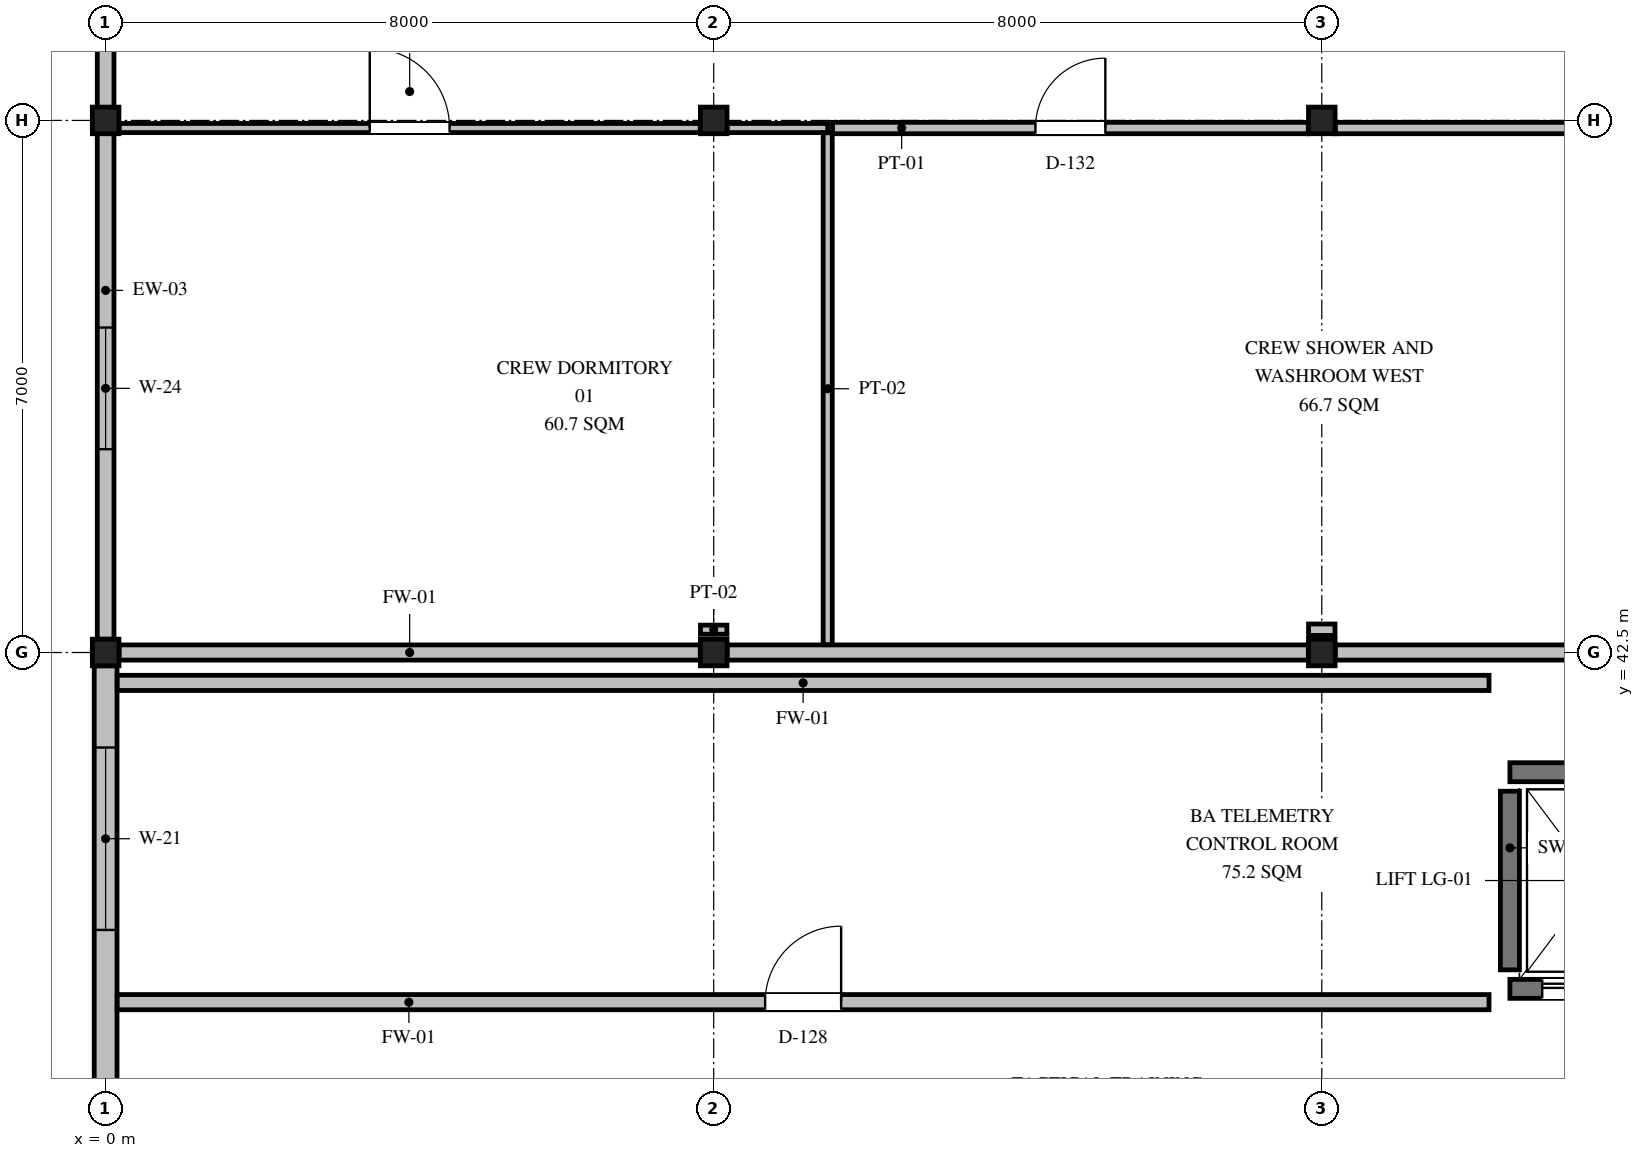
"""IFC4 building model, lengths in metres.
Left out: names, types, materials, properties, quantities, classifications, styles, units other than length and angle.
Written with IfcOpenShell. Run it as: python <this file> out.ifc"""

import sys

from ifc_helpers import new_model, si_unit, direction, frame, frame_2d, origin, origin_2d, place, context, subcontext, project, spatial, rectangle, i_section, extrude, element, fill, save


model = new_model("IFC4")
c1 = context("Model", 3, precision=1e-05, world=origin(), true_north=direction((0.0, 1.0)))
c2 = subcontext(c1, "Body", "Model", "MODEL_VIEW")
j1 = project(units=[si_unit("LENGTHUNIT", "METRE"), si_unit("PLANEANGLEUNIT", "RADIAN")], contexts=[c1])
p1 = place(None, origin())
s1 = spatial("IfcSite", under=j1, at=p1, CompositionType="ELEMENT")
p2 = place(p1, origin())
s2 = spatial("IfcBuilding", under=s1, at=p2, CompositionType="ELEMENT")
p3 = place(p2, frame((0.0, 0.0, 5.85)))
s3 = spatial("IfcBuildingStorey", under=s2, at=p3, CompositionType="ELEMENT", Elevation=5.85)
for number, where, z_axis, x_axis in (
    (1, (0.0, 42.5, 0.0), (0.0, 0.0, 1.0), (1.0, 0.0, 0.0)),
    (2, (0.0, 49.5, 0.0), (0.0, 0.0, 1.0), (1.0, 0.0, 0.0)),
    (3, (8.0, 42.5, 0.0), (0.0, 0.0, 1.0), (1.0, 0.0, 0.0)),
    (4, (8.0, 49.5, 0.0), (0.0, 0.0, 1.0), (1.0, 0.0, 0.0)),
    (5, (16.0, 42.5, 0.0), (0.0, 0.0, 1.0), (1.0, 0.0, 0.0)),
    (6, (16.0, 49.5, 0.0), (0.0, 0.0, 1.0), (1.0, 0.0, 0.0)),
):
    element("IfcColumn", number, at=place(p3, frame(where, z_axis=z_axis, x_axis=x_axis)), inside=s3, PredefinedType="COLUMN", context=c2, shape_type="SweptSolid", body=[
        extrude(i_section(OverallWidth=0.35, OverallDepth=0.35, WebThickness=0.012, FlangeThickness=0.019, FilletRadius=0.02, at=origin_2d()), origin(), (0.0, 0.0, 1.0), 4.2),
    ])
p4 = place(p3, frame((0.0, 22.65, 0.0), z_axis=(0.0, 0.0, 1.0), x_axis=(0.0, 1.0, 0.0)))
e7 = element("IfcWall", 7, at=p4, inside=s3, PredefinedType="SOLIDWALL", context=c2, shape_type="SweptSolid", body=[
    extrude(rectangle(XDim=19.675, YDim=0.3, at=frame_2d((9.837, 0.0))), origin(), (0.0, 0.0, 1.0), 3.444),
])
p5 = place(p4, frame((8.5, 0.0, 1.1)))
e8 = element("IfcOpeningElement", 8, at=p5, cuts=e7, PredefinedType="OPENING", context=c2, shape_type="SweptSolid", body=[
    extrude(rectangle(XDim=2.2, YDim=1.5, at=frame_2d((1.1, 0.75))), frame((0.0, 0.16, 0.0), z_axis=(0.0, -1.0, 0.0), x_axis=(1.0, 0.0, 0.0)), (0.0, 0.0, 1.0), 0.32),
])
p6 = place(p4, frame((16.2, 0.0, 1.1)))
e9 = element("IfcOpeningElement", 9, at=p6, cuts=e7, PredefinedType="OPENING", context=c2, shape_type="SweptSolid", body=[
    extrude(rectangle(XDim=2.4, YDim=1.5, at=frame_2d((1.2, 0.75))), frame((0.0, 0.16, 0.0), z_axis=(0.0, -1.0, 0.0), x_axis=(1.0, 0.0, 0.0)), (0.0, 0.0, 1.0), 0.32),
])
p7 = place(p3, frame((0.0, 42.675, 0.0), z_axis=(0.0, 0.0, 1.0), x_axis=(0.0, 1.0, 0.0)))
e10 = element("IfcWall", 10, at=p7, inside=s3, PredefinedType="SOLIDWALL", context=c2, shape_type="SweptSolid", body=[
    extrude(rectangle(XDim=13.65, YDim=0.22, at=frame_2d((6.825, 0.0))), origin(), (0.0, 0.0, 1.0), 3.494),
])
p8 = place(p7, frame((2.5, 0.0, 1.0)))
e11 = element("IfcOpeningElement", 11, at=p8, cuts=e10, PredefinedType="OPENING", context=c2, shape_type="SweptSolid", body=[
    extrude(rectangle(XDim=1.6, YDim=1.8, at=frame_2d((0.8, 0.9))), frame((0.0, 0.12, 0.0), z_axis=(0.0, -1.0, 0.0), x_axis=(1.0, 0.0, 0.0)), (0.0, 0.0, 1.0), 0.24),
])
p9 = place(p3, frame((18.475, 38.075, 0.0), z_axis=(0.0, 0.0, 1.0), x_axis=(1.0, 0.0, 0.0)))
e12 = element("IfcWall", 12, at=p9, inside=s3, PredefinedType="SHEAR", context=c2, shape_type="SweptSolid", body=[
    extrude(rectangle(XDim=2.25, YDim=0.25, at=frame_2d((1.125, 0.0))), origin(), (0.0, 0.0, 1.0), 4.0),
])
p10 = place(p9, frame((0.425, 0.0, 0.0)))
e13 = element("IfcOpeningElement", 13, at=p10, cuts=e12, PredefinedType="OPENING", context=c2, shape_type="SweptSolid", body=[
    extrude(rectangle(XDim=1.4, YDim=2.2, at=frame_2d((0.7, 1.1))), frame((0.0, 0.135, 0.0), z_axis=(0.0, -1.0, 0.0), x_axis=(1.0, 0.0, 0.0)), (0.0, 0.0, 1.0), 0.27),
])
p11 = place(p3, frame((18.475, 40.925, 0.0), z_axis=(0.0, 0.0, 1.0), x_axis=(1.0, 0.0, 0.0)))
e14 = element("IfcWall", 14, at=p11, inside=s3, PredefinedType="SHEAR", context=c2, shape_type="SweptSolid", body=[
    extrude(rectangle(XDim=2.25, YDim=0.25, at=frame_2d((1.125, 0.0))), origin(), (0.0, 0.0, 1.0), 4.0),
])
p12 = place(p3, frame((18.475, 38.325, 0.0), z_axis=(0.0, 0.0, 1.0), x_axis=(0.0, 1.0, 0.0)))
e15 = element("IfcWall", 15, at=p12, inside=s3, PredefinedType="SHEAR", context=c2, shape_type="SweptSolid", body=[
    extrude(rectangle(XDim=2.35, YDim=0.25, at=frame_2d((1.175, 0.0))), origin(), (0.0, 0.0, 1.0), 4.0),
])
p13 = place(p3, frame((0.177, 42.5, 0.0), z_axis=(0.0, 0.0, 1.0), x_axis=(1.0, 0.0, 0.0)))
e16 = element("IfcWall", 16, at=p13, inside=s3, PredefinedType="PARTITIONING", context=c2, shape_type="SweptSolid", body=[
    extrude(rectangle(XDim=7.646, YDim=0.2, at=frame_2d((3.823, 0.0))), origin(), (0.0, 0.0, 1.0), 3.494),
])
p14 = place(p3, frame((8.177, 42.5, 0.0), z_axis=(0.0, 0.0, 1.0), x_axis=(1.0, 0.0, 0.0)))
e17 = element("IfcWall", 17, at=p14, inside=s3, PredefinedType="PARTITIONING", context=c2, shape_type="SweptSolid", body=[
    extrude(rectangle(XDim=7.646, YDim=0.2, at=frame_2d((3.823, 0.0))), origin(), (0.0, 0.0, 1.0), 3.544),
])
p15 = place(p3, frame((16.177, 42.5, 0.0), z_axis=(0.0, 0.0, 1.0), x_axis=(1.0, 0.0, 0.0)))
e18 = element("IfcWall", 18, at=p15, inside=s3, PredefinedType="PARTITIONING", context=c2, shape_type="SweptSolid", body=[
    extrude(rectangle(XDim=7.646, YDim=0.2, at=frame_2d((3.823, 0.0))), origin(), (0.0, 0.0, 1.0), 3.494),
])
p16 = place(p3, frame((0.153, 37.9, 0.0), z_axis=(0.0, 0.0, 1.0), x_axis=(1.0, 0.0, 0.0)))
e19 = element("IfcWall", 19, at=p16, inside=s3, PredefinedType="PARTITIONING", context=c2, shape_type="SweptSolid", body=[
    extrude(rectangle(XDim=18.047, YDim=0.2, at=frame_2d((9.023, 0.0))), origin(), (0.0, 0.0, 1.0), 4.0),
])
p17 = place(p16, frame((8.523, 0.0, 0.0)))
e20 = element("IfcOpeningElement", 20, at=p17, cuts=e19, PredefinedType="OPENING", context=c2, shape_type="SweptSolid", body=[
    extrude(rectangle(XDim=1.0, YDim=2.1, at=frame_2d((0.5, 1.05))), frame((0.0, 0.11, 0.0), z_axis=(0.0, -1.0, 0.0), x_axis=(1.0, 0.0, 0.0)), (0.0, 0.0, 1.0), 0.22),
])
p18 = place(p3, frame((0.153, 42.1, 0.0), z_axis=(0.0, 0.0, 1.0), x_axis=(1.0, 0.0, 0.0)))
e21 = element("IfcWall", 21, at=p18, inside=s3, PredefinedType="PARTITIONING", context=c2, shape_type="SweptSolid", body=[
    extrude(rectangle(XDim=18.047, YDim=0.2, at=frame_2d((9.023, 0.0))), origin(), (0.0, 0.0, 1.0), 4.0),
])
p19 = place(p3, frame((7.826, 42.8, 0.0), z_axis=(0.0, 0.0, 1.0), x_axis=(1.0, 0.0, 0.0)))
e22 = element("IfcWall", 22, at=p19, inside=s3, PredefinedType="PARTITIONING", context=c2, shape_type="SweptSolid", body=[
    extrude(rectangle(XDim=0.348, YDim=0.12, at=frame_2d((0.174, 0.0))), origin(), (0.0, 0.0, 1.0), 4.0),
])
p20 = place(p3, frame((0.178, 49.4, 0.0), z_axis=(0.0, 0.0, 1.0), x_axis=(1.0, 0.0, 0.0)))
e23 = element("IfcWall", 23, at=p20, inside=s3, PredefinedType="PARTITIONING", context=c2, shape_type="SweptSolid", body=[
    extrude(rectangle(XDim=7.644, YDim=0.12, at=frame_2d((3.822, 0.0))), origin(), (0.0, 0.0, 1.0), 3.344),
])
p21 = place(p20, frame((3.297, 0.0, 0.0)))
e24 = element("IfcOpeningElement", 24, at=p21, cuts=e23, PredefinedType="OPENING", context=c2, shape_type="SweptSolid", body=[
    extrude(rectangle(XDim=1.05, YDim=2.1, at=frame_2d((0.525, 1.05))), frame((0.0, 0.07, 0.0), z_axis=(0.0, -1.0, 0.0), x_axis=(1.0, 0.0, 0.0)), (0.0, 0.0, 1.0), 0.14),
])
p22 = place(p3, frame((8.178, 49.4, 0.0), z_axis=(0.0, 0.0, 1.0), x_axis=(1.0, 0.0, 0.0)))
e25 = element("IfcWall", 25, at=p22, inside=s3, PredefinedType="PARTITIONING", context=c2, shape_type="SweptSolid", body=[
    extrude(rectangle(XDim=1.322, YDim=0.12, at=frame_2d((0.661, 0.0))), origin(), (0.0, 0.0, 1.0), 3.394),
])
p23 = place(p3, frame((9.5, 42.603, 0.0), z_axis=(0.0, 0.0, 1.0), x_axis=(0.0, 1.0, 0.0)))
e26 = element("IfcWall", 26, at=p23, inside=s3, PredefinedType="PARTITIONING", context=c2, shape_type="SweptSolid", body=[
    extrude(rectangle(XDim=6.734, YDim=0.12, at=frame_2d((3.367, 0.0))), origin(), (0.0, 0.0, 1.0), 3.7),
])
p24 = place(p3, frame((15.826, 42.8, 0.0), z_axis=(0.0, 0.0, 1.0), x_axis=(1.0, 0.0, 0.0)))
e27 = element("IfcWall", 27, at=p24, inside=s3, PredefinedType="PARTITIONING", context=c2, shape_type="SweptSolid", body=[
    extrude(rectangle(XDim=0.348, YDim=0.15, at=frame_2d((0.174, 0.0))), origin(), (0.0, 0.0, 1.0), 4.0),
])
p25 = place(p3, frame((9.563, 49.4, 0.0), z_axis=(0.0, 0.0, 1.0), x_axis=(1.0, 0.0, 0.0)))
e28 = element("IfcWall", 28, at=p25, inside=s3, PredefinedType="PARTITIONING", context=c2, shape_type="SweptSolid", body=[
    extrude(rectangle(XDim=6.259, YDim=0.15, at=frame_2d((3.129, 0.0))), origin(), (0.0, 0.0, 1.0), 3.394),
])
p26 = place(p25, frame((2.669, 0.0, 0.0)))
e29 = element("IfcOpeningElement", 29, at=p26, cuts=e28, PredefinedType="OPENING", context=c2, shape_type="SweptSolid", body=[
    extrude(rectangle(XDim=0.92, YDim=2.1, at=frame_2d((0.46, 1.05))), frame((0.0, 0.085, 0.0), z_axis=(0.0, -1.0, 0.0), x_axis=(1.0, 0.0, 0.0)), (0.0, 0.0, 1.0), 0.17),
])
p27 = place(p3, frame((16.178, 49.4, 0.0), z_axis=(0.0, 0.0, 1.0), x_axis=(1.0, 0.0, 0.0)))
e30 = element("IfcWall", 30, at=p27, inside=s3, PredefinedType="PARTITIONING", context=c2, shape_type="SweptSolid", body=[
    extrude(rectangle(XDim=3.422, YDim=0.15, at=frame_2d((1.711, 0.0))), origin(), (0.0, 0.0, 1.0), 3.444),
])
p28 = place(p6, origin())
e31 = element("IfcWindow", 31, at=p28, inside=s3, PartitioningType="SINGLE_PANEL", PredefinedType="WINDOW", context=c2, shape_type="SweptSolid", body=[
    extrude(rectangle(XDim=2.4, YDim=1.5, at=frame_2d((1.2, 0.75))), frame((0.0, 0.03, 0.0), z_axis=(0.0, -1.0, 0.0), x_axis=(1.0, 0.0, 0.0)), (0.0, 0.0, 1.0), 0.06),
])
fill(e9, e31)
p29 = place(p8, origin())
e32 = element("IfcWindow", 32, at=p29, inside=s3, PartitioningType="SINGLE_PANEL", PredefinedType="WINDOW", context=c2, shape_type="SweptSolid", body=[
    extrude(rectangle(XDim=1.6, YDim=1.8, at=frame_2d((0.8, 0.9))), frame((0.0, 0.03, 0.0), z_axis=(0.0, -1.0, 0.0), x_axis=(1.0, 0.0, 0.0)), (0.0, 0.0, 1.0), 0.06),
])
fill(e11, e32)
p30 = place(p10, origin())
e33 = element("IfcDoor", 33, at=p30, inside=s3, OperationType="DOUBLE_DOOR_SLIDING", PredefinedType="DOOR", context=c2, shape_type="SweptSolid", body=[
    extrude(rectangle(XDim=1.4, YDim=2.2, at=frame_2d((0.7, 1.1))), frame((0.0, 0.025, 0.0), z_axis=(0.0, -1.0, 0.0), x_axis=(1.0, 0.0, 0.0)), (0.0, 0.0, 1.0), 0.05),
])
fill(e13, e33)
p31 = place(p17, origin())
e34 = element("IfcDoor", 34, at=p31, inside=s3, OperationType="SINGLE_SWING_RIGHT", PredefinedType="DOOR", context=c2, shape_type="SweptSolid", body=[
    extrude(rectangle(XDim=1.0, YDim=2.1, at=frame_2d((0.5, 1.05))), frame((0.0, 0.025, 0.0), z_axis=(0.0, -1.0, 0.0), x_axis=(1.0, 0.0, 0.0)), (0.0, 0.0, 1.0), 0.05),
])
fill(e20, e34)
p32 = place(p21, origin())
e35 = element("IfcDoor", 35, at=p32, inside=s3, OperationType="SINGLE_SWING_LEFT", PredefinedType="DOOR", context=c2, shape_type="SweptSolid", body=[
    extrude(rectangle(XDim=1.05, YDim=2.1, at=frame_2d((0.525, 1.05))), frame((0.0, 0.025, 0.0), z_axis=(0.0, -1.0, 0.0), x_axis=(1.0, 0.0, 0.0)), (0.0, 0.0, 1.0), 0.05),
])
fill(e24, e35)
p33 = place(p26, origin())
e36 = element("IfcDoor", 36, at=p33, inside=s3, OperationType="SINGLE_SWING_RIGHT", PredefinedType="DOOR", context=c2, shape_type="SweptSolid", body=[
    extrude(rectangle(XDim=0.92, YDim=2.1, at=frame_2d((0.46, 1.05))), frame((0.0, 0.025, 0.0), z_axis=(0.0, -1.0, 0.0), x_axis=(1.0, 0.0, 0.0)), (0.0, 0.0, 1.0), 0.05),
])
fill(e29, e36)
save(model, sys.argv[1])
